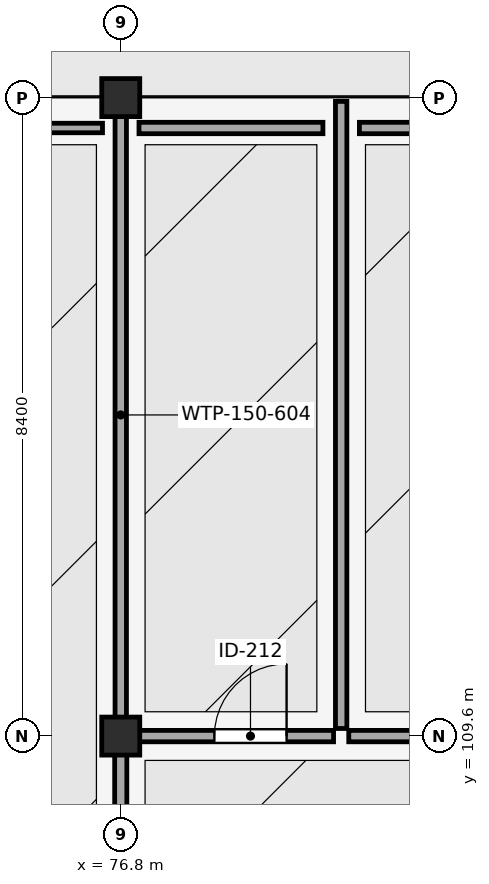
"""IFC4 building model, lengths in metres.
Left out: names, types, materials, properties, quantities, classifications, styles, units other than length and angle.
Written with IfcOpenShell. Run it as: python <this file> out.ifc"""

import sys

from ifc_helpers import new_model, si_unit, direction, frame, frame_2d, origin, origin_2d, place, context, subcontext, project, spatial, rectangle, extrude, element, fill, save


model = new_model("IFC4")
c1 = context("Model", 3, precision=1e-05, world=origin(), true_north=direction((0.0, 1.0)))
c2 = subcontext(c1, "Body", "Model", "MODEL_VIEW")
j1 = project(units=[si_unit("LENGTHUNIT", "METRE"), si_unit("PLANEANGLEUNIT", "RADIAN")], contexts=[c1])
p1 = place(None, origin())
s1 = spatial("IfcSite", under=j1, at=p1, CompositionType="ELEMENT")
p2 = place(p1, origin())
s2 = spatial("IfcBuilding", under=s1, at=p2, CompositionType="ELEMENT")
p3 = place(p2, frame((0.0, 0.0, 14.1)))
s3 = spatial("IfcBuildingStorey", under=s2, at=p3, CompositionType="ELEMENT", Elevation=14.1)
p4 = place(p3, frame((76.8, 109.6, 0.0), z_axis=(0.0, 0.0, 1.0), x_axis=(1.0, 0.0, 0.0)))
e1 = element("IfcColumn", 1, at=p4, inside=s3, PredefinedType="COLUMN", context=c2, shape_type="SweptSolid", body=[
    extrude(rectangle(XDim=0.5, YDim=0.5, at=origin_2d()), origin(), (0.0, 0.0, 1.0), 4.5),
])
p5 = place(p3, frame((76.8, 118.0, 0.0), z_axis=(0.0, 0.0, 1.0), x_axis=(1.0, 0.0, 0.0)))
e2 = element("IfcColumn", 2, at=p5, inside=s3, PredefinedType="COLUMN", context=c2, shape_type="SweptSolid", body=[
    extrude(rectangle(XDim=0.5, YDim=0.5, at=origin_2d()), origin(), (0.0, 0.0, 1.0), 3.851),
])
p6 = place(p3, frame((76.8, 107.0, 0.0), z_axis=(0.0, 0.0, 1.0), x_axis=(0.0, 1.0, 0.0)))
e3 = element("IfcWall", 3, at=p6, inside=s3, PredefinedType="PARTITIONING", context=c2, shape_type="SweptSolid", body=[
    extrude(rectangle(XDim=2.5, YDim=0.16, at=frame_2d((1.25, 0.0))), origin(), (0.0, 0.0, 1.0), 3.1),
])
p7 = place(p6, frame((0.443, 0.0, 0.0)))
e4 = element("IfcOpeningElement", 4, at=p7, cuts=e3, PredefinedType="OPENING", context=c2, shape_type="SweptSolid", body=[
    extrude(rectangle(XDim=0.95, YDim=2.15, at=frame_2d((0.475, 1.075))), frame((0.0, 0.09, 0.0), z_axis=(0.0, -1.0, 0.0), x_axis=(1.0, 0.0, 0.0)), (0.0, 0.0, 1.0), 0.18),
])
p8 = place(p3, frame((76.8, 109.7, 0.0), z_axis=(0.0, 0.0, 1.0), x_axis=(0.0, 1.0, 0.0)))
e5 = element("IfcWall", 5, at=p8, inside=s3, PredefinedType="PARTITIONING", context=c2, shape_type="SweptSolid", body=[
    extrude(rectangle(XDim=8.25, YDim=0.15, at=frame_2d((4.125, 0.0))), origin(), (0.0, 0.0, 1.0), 2.992),
])
p9 = place(p3, frame((76.9, 109.6, 0.0), z_axis=(0.0, 0.0, 1.0), x_axis=(1.0, 0.0, 0.0)))
e6 = element("IfcWall", 6, at=p9, inside=s3, PredefinedType="PARTITIONING", context=c2, shape_type="SweptSolid", body=[
    extrude(rectangle(XDim=2.7, YDim=0.15, at=frame_2d((1.35, 0.0))), origin(), (0.0, 0.0, 1.0), 3.1),
])
p10 = place(p9, frame((1.132, 0.0, 0.0)))
e7 = element("IfcOpeningElement", 7, at=p10, cuts=e6, PredefinedType="OPENING", context=c2, shape_type="SweptSolid", body=[
    extrude(rectangle(XDim=0.95, YDim=2.15, at=frame_2d((0.475, 1.075))), frame((0.0, 0.085, 0.0), z_axis=(0.0, -1.0, 0.0), x_axis=(1.0, 0.0, 0.0)), (0.0, 0.0, 1.0), 0.17),
])
p11 = place(p3, frame((79.8, 109.6, 0.0), z_axis=(0.0, 0.0, 1.0), x_axis=(1.0, 0.0, 0.0)))
e8 = element("IfcWall", 8, at=p11, inside=s3, PredefinedType="PARTITIONING", context=c2, shape_type="SweptSolid", body=[
    extrude(rectangle(XDim=3.2, YDim=0.15, at=frame_2d((1.6, 0.0))), origin(), (0.0, 0.0, 1.0), 3.1),
])
p12 = place(p11, frame((1.15, 0.0, 0.0)))
e9 = element("IfcOpeningElement", 9, at=p12, cuts=e8, PredefinedType="OPENING", context=c2, shape_type="SweptSolid", body=[
    extrude(rectangle(XDim=0.9, YDim=2.15, at=frame_2d((0.45, 1.075))), frame((0.0, 0.085, 0.0), z_axis=(0.0, -1.0, 0.0), x_axis=(1.0, 0.0, 0.0)), (0.0, 0.0, 1.0), 0.17),
])
p13 = place(p3, frame((79.7, 109.7, 0.0), z_axis=(0.0, 0.0, 1.0), x_axis=(0.0, 1.0, 0.0)))
e10 = element("IfcWall", 10, at=p13, inside=s3, PredefinedType="PARTITIONING", context=c2, shape_type="SweptSolid", body=[
    extrude(rectangle(XDim=8.25, YDim=0.15, at=frame_2d((4.125, 0.0))), origin(), (0.0, 0.0, 1.0), 3.1),
])
p14 = place(p3, frame((48.05, 117.6, 0.0), z_axis=(0.0, 0.0, 1.0), x_axis=(1.0, 0.0, 0.0)))
e11 = element("IfcWall", 11, at=p14, inside=s3, PredefinedType="PARTITIONING", context=c2, shape_type="SweptSolid", body=[
    extrude(rectangle(XDim=28.51, YDim=0.125, at=frame_2d((14.255, 0.0))), origin(), (0.0, 0.0, 1.0), 3.1),
])
p15 = place(p3, frame((77.04, 117.6, 0.0), z_axis=(0.0, 0.0, 1.0), x_axis=(1.0, 0.0, 0.0)))
e12 = element("IfcWall", 12, at=p15, inside=s3, PredefinedType="PARTITIONING", context=c2, shape_type="SweptSolid", body=[
    extrude(rectangle(XDim=2.42, YDim=0.15, at=frame_2d((1.21, 0.0))), origin(), (0.0, 0.0, 1.0), 3.1),
])
p16 = place(p3, frame((79.94, 117.6, 0.0), z_axis=(0.0, 0.0, 1.0), x_axis=(1.0, 0.0, 0.0)))
e13 = element("IfcWall", 13, at=p16, inside=s3, PredefinedType="PARTITIONING", context=c2, shape_type="SweptSolid", body=[
    extrude(rectangle(XDim=2.92, YDim=0.15, at=frame_2d((1.46, 0.0))), origin(), (0.0, 0.0, 1.0), 3.1),
])
p17 = place(p10, origin())
e14 = element("IfcDoor", 14, at=p17, inside=s3, OperationType="SINGLE_SWING_RIGHT", PredefinedType="DOOR", context=c2, shape_type="SweptSolid", body=[
    extrude(rectangle(XDim=0.95, YDim=2.15, at=frame_2d((0.475, 1.075))), frame((0.0, 0.025, 0.0), z_axis=(0.0, -1.0, 0.0), x_axis=(1.0, 0.0, 0.0)), (0.0, 0.0, 1.0), 0.05),
])
fill(e7, e14)
save(model, sys.argv[1])
